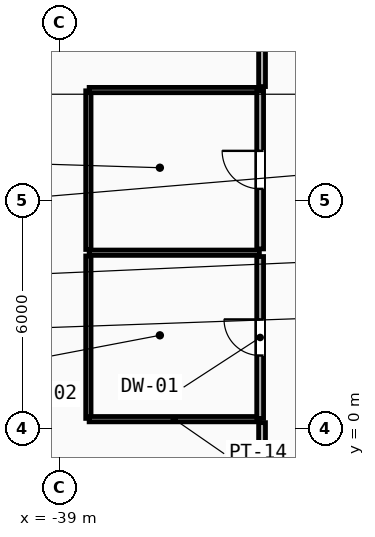
"""IFC4 building model, lengths in metres.
Left out: names, types, materials, properties, quantities, classifications, styles, units other than length and angle.
Written with IfcOpenShell. Run it as: python <this file> out.ifc"""

import sys

from ifc_helpers import new_model, si_unit, direction, frame, frame_2d, origin, place, context, subcontext, project, spatial, rectangle, extrude, element, fill, save


model = new_model("IFC4")
c1 = context("Model", 3, precision=1e-05, world=origin(), true_north=direction((0.0, 1.0)))
c2 = subcontext(c1, "Body", "Model", "MODEL_VIEW")
j1 = project(units=[si_unit("LENGTHUNIT", "METRE"), si_unit("PLANEANGLEUNIT", "RADIAN")], contexts=[c1])
p1 = place(None, origin())
s1 = spatial("IfcSite", under=j1, at=p1, CompositionType="ELEMENT")
p2 = place(p1, origin())
s2 = spatial("IfcBuilding", under=s1, at=p2, CompositionType="ELEMENT")
p3 = place(p2, frame((0.0, 0.0, 69.6)))
s3 = spatial("IfcBuildingStorey", under=s2, at=p3, CompositionType="ELEMENT", Elevation=69.6)
p4 = place(p3, frame((-38.24, 0.27, 0.0), z_axis=(0.0, 0.0, 1.0), x_axis=(0.0, 1.0, 0.0)))
e1 = element("IfcWall", 1, at=p4, inside=s3, PredefinedType="PARTITIONING", context=c2, shape_type="SweptSolid", body=[
    extrude(rectangle(XDim=4.275, YDim=0.14, at=frame_2d((2.137, 0.0))), origin(), (0.0, 0.0, 1.0), 3.5),
])
p5 = place(p3, frame((-38.24, 4.715, 0.0), z_axis=(0.0, 0.0, 1.0), x_axis=(0.0, 1.0, 0.0)))
e2 = element("IfcWall", 2, at=p5, inside=s3, PredefinedType="PARTITIONING", context=c2, shape_type="SweptSolid", body=[
    extrude(rectangle(XDim=4.175, YDim=0.14, at=frame_2d((2.087, 0.0))), origin(), (0.0, 0.0, 1.0), 3.5),
])
for number, where, z_axis, x_axis in (
    (3, (-38.22, 0.25, 0.0), (0.0, 0.0, 1.0), (1.0, 0.0, 0.0)),
    (4, (-38.22, 4.63, 0.0), (0.0, 0.0, 1.0), (1.0, 0.0, 0.0)),
    (5, (-38.22, 8.91, 0.0), (0.0, 0.0, 1.0), (1.0, 0.0, 0.0)),
):
    element("IfcWall", number, at=place(p3, frame(where, z_axis=z_axis, x_axis=x_axis)), inside=s3, PredefinedType="PARTITIONING", context=c2, shape_type="SweptSolid", body=[
        extrude(rectangle(XDim=4.48, YDim=0.14, at=frame_2d((2.24, 0.0))), origin(), (0.0, 0.0, 1.0), 3.5),
    ])
p6 = place(p3, frame((-33.72, 0.27, 0.0), z_axis=(0.0, 0.0, 1.0), x_axis=(0.0, 1.0, 0.0)))
e6 = element("IfcWall", 6, at=p6, inside=s3, PredefinedType="PARTITIONING", context=c2, shape_type="SweptSolid", body=[
    extrude(rectangle(XDim=4.26, YDim=0.18, at=frame_2d((2.13, 0.0))), origin(), (0.0, 0.0, 1.0), 3.5),
])
p7 = place(p6, frame((1.655, 0.0, 0.0)))
e7 = element("IfcOpeningElement", 7, at=p7, cuts=e6, PredefinedType="OPENING", context=c2, shape_type="SweptSolid", body=[
    extrude(rectangle(XDim=0.95, YDim=2.1, at=frame_2d((0.475, 1.05))), frame((0.0, 0.1, 0.0), z_axis=(0.0, -1.0, 0.0), x_axis=(1.0, 0.0, 0.0)), (0.0, 0.0, 1.0), 0.2),
])
p8 = place(p3, frame((-33.72, 4.73, 0.0), z_axis=(0.0, 0.0, 1.0), x_axis=(0.0, 1.0, 0.0)))
e8 = element("IfcWall", 8, at=p8, inside=s3, PredefinedType="PARTITIONING", context=c2, shape_type="SweptSolid", body=[
    extrude(rectangle(XDim=4.16, YDim=0.18, at=frame_2d((2.08, 0.0))), origin(), (0.0, 0.0, 1.0), 3.5),
])
p9 = place(p8, frame((1.58, 0.0, 0.0)))
e9 = element("IfcOpeningElement", 9, at=p9, cuts=e8, PredefinedType="OPENING", context=c2, shape_type="SweptSolid", body=[
    extrude(rectangle(XDim=1.0, YDim=2.15, at=frame_2d((0.5, 1.075))), frame((0.0, 0.1, 0.0), z_axis=(0.0, -1.0, 0.0), x_axis=(1.0, 0.0, 0.0)), (0.0, 0.0, 1.0), 0.2),
])
p10 = place(p3, frame((-33.67, 0.159, 0.0), z_axis=(0.0, 0.0, 1.0), x_axis=(0.0, -1.0, 0.0)))
e10 = element("IfcWall", 10, at=p10, inside=s3, PredefinedType="PARTITIONING", context=c2, shape_type="SweptSolid", body=[
    extrude(rectangle(XDim=11.559, YDim=0.18, at=frame_2d((5.779, 0.0))), origin(), (0.0, 0.0, 1.0), 3.5),
])
p11 = place(p3, frame((-33.67, 17.428, 0.0), z_axis=(0.0, 0.0, 1.0), x_axis=(0.0, -1.0, 0.0)))
e11 = element("IfcWall", 11, at=p11, inside=s3, PredefinedType="PARTITIONING", context=c2, shape_type="SweptSolid", body=[
    extrude(rectangle(XDim=8.427, YDim=0.18, at=frame_2d((4.213, 0.0))), origin(), (0.0, 0.0, 1.0), 3.5),
])
p12 = place(p7, origin())
e12 = element("IfcDoor", 12, at=p12, inside=s3, OperationType="SINGLE_SWING_RIGHT", PredefinedType="DOOR", context=c2, shape_type="SweptSolid", body=[
    extrude(rectangle(XDim=0.95, YDim=2.1, at=frame_2d((0.475, 1.05))), frame((0.0, 0.025, 0.0), z_axis=(0.0, -1.0, 0.0), x_axis=(1.0, 0.0, 0.0)), (0.0, 0.0, 1.0), 0.05),
])
fill(e7, e12)
p13 = place(p9, origin())
e13 = element("IfcDoor", 13, at=p13, inside=s3, OperationType="SINGLE_SWING_RIGHT", PredefinedType="DOOR", context=c2, shape_type="SweptSolid", body=[
    extrude(rectangle(XDim=1.0, YDim=2.15, at=frame_2d((0.5, 1.075))), frame((0.0, 0.025, 0.0), z_axis=(0.0, -1.0, 0.0), x_axis=(1.0, 0.0, 0.0)), (0.0, 0.0, 1.0), 0.05),
])
fill(e9, e13)
save(model, sys.argv[1])
